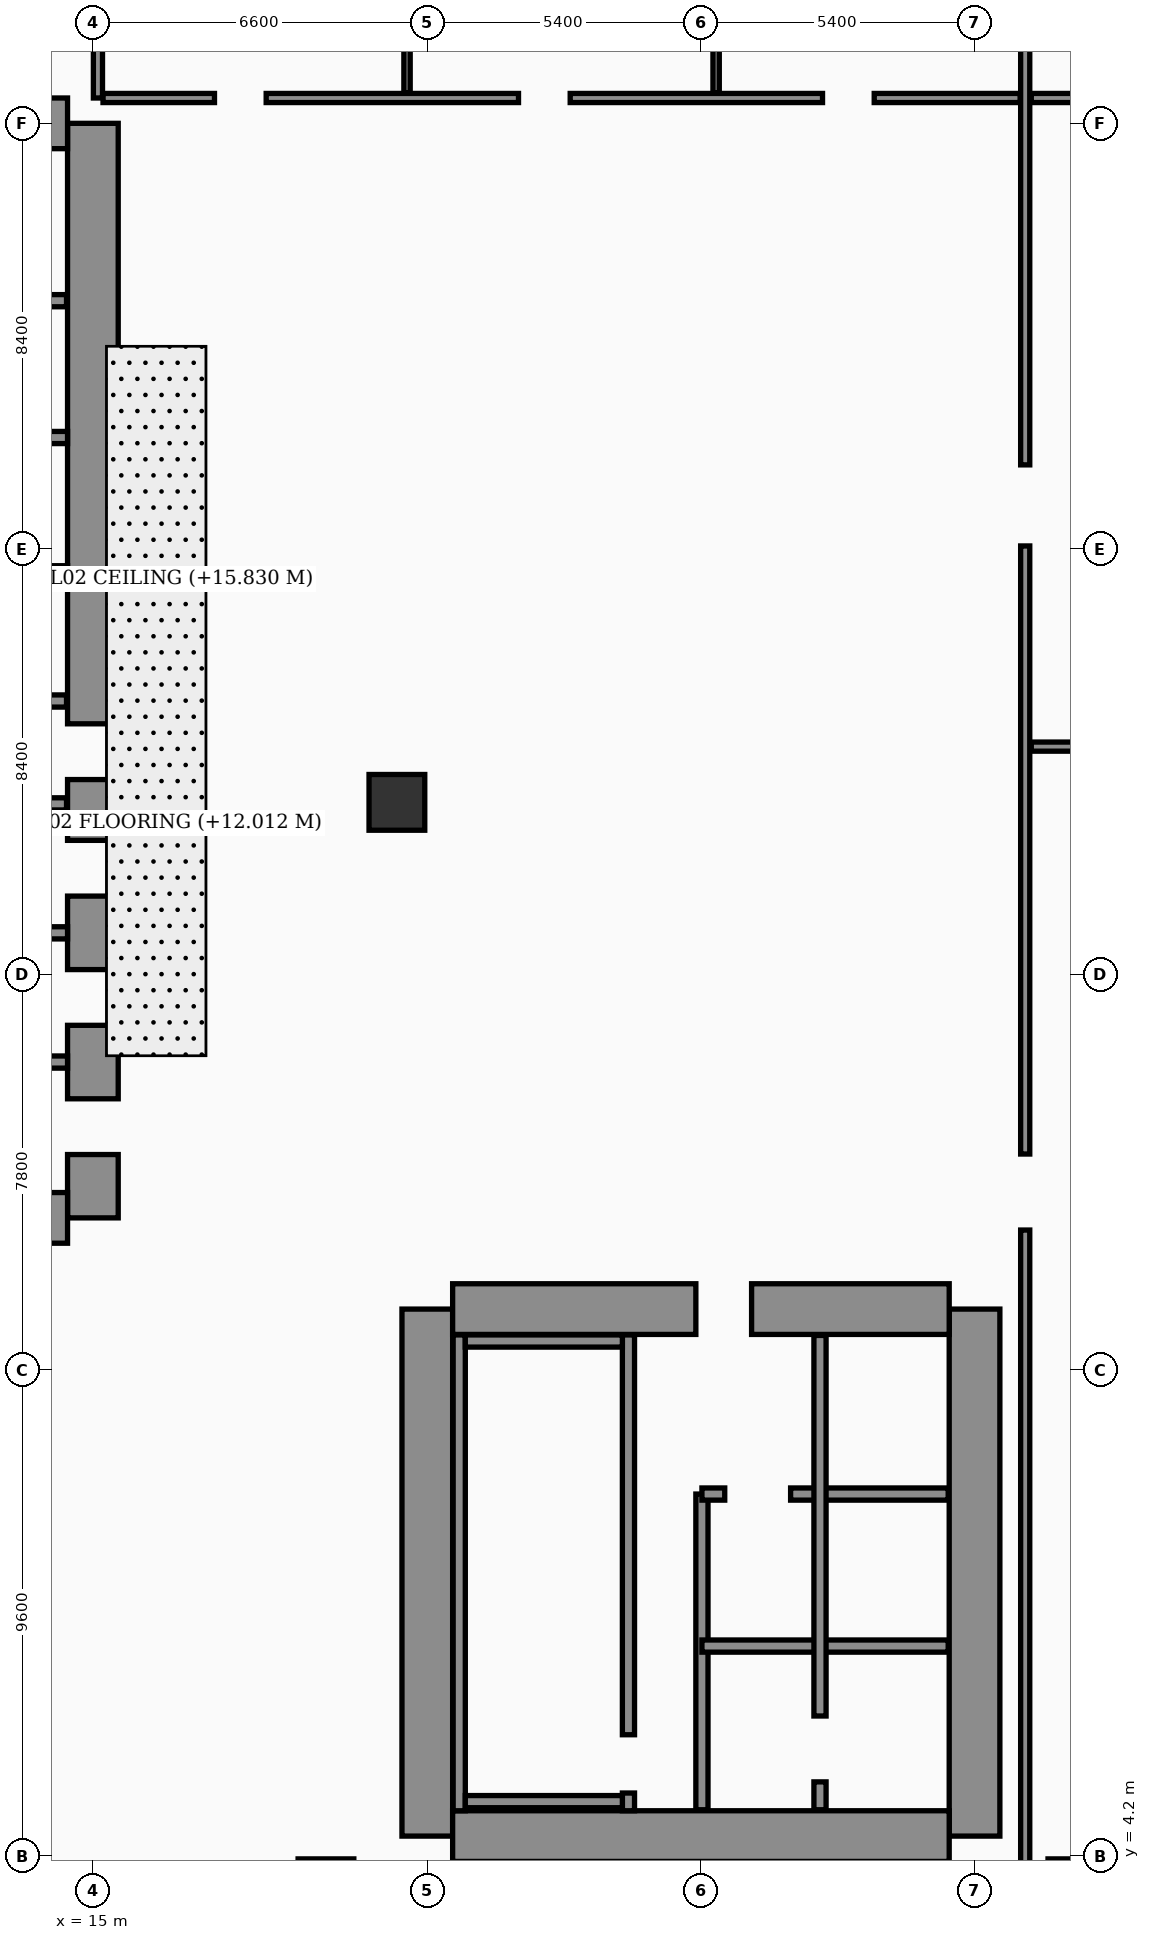
"""IFC4 building model, lengths in metres.
Left out: names, types, materials, properties, quantities, classifications, styles, units other than length and angle.
Written with IfcOpenShell. Run it as: python <this file> out.ifc"""

import sys

from ifc_helpers import new_model, si_unit, direction, frame, frame_2d, origin, origin_2d, place, context, subcontext, project, spatial, rectangle, hollow_rectangle, extrude, element, fill, save


model = new_model("IFC4")
c1 = context("Model", 3, precision=1e-05, world=origin(), true_north=direction((0.0, 1.0)))
c2 = subcontext(c1, "Body", "Model", "MODEL_VIEW")
j1 = project(units=[si_unit("LENGTHUNIT", "METRE"), si_unit("PLANEANGLEUNIT", "RADIAN")], contexts=[c1])
p1 = place(None, origin())
s1 = spatial("IfcSite", under=j1, at=p1, CompositionType="ELEMENT")
p2 = place(p1, origin())
s2 = spatial("IfcBuilding", under=s1, at=p2, CompositionType="ELEMENT")
p3 = place(p2, frame((0.0, 0.0, 12.0)))
s3 = spatial("IfcBuildingStorey", under=s2, at=p3, CompositionType="ELEMENT", Elevation=12.0)
p4 = place(p3, frame((15.0, 16.8, 0.0), z_axis=(0.0, 0.0, 1.0), x_axis=(0.0, 1.0, 0.0)))
e1 = element("IfcWall", 1, at=p4, inside=s3, PredefinedType="SHEAR", context=c2, shape_type="SweptSolid", body=[
    extrude(rectangle(XDim=21.6, YDim=1.0, at=frame_2d((10.8, 0.0))), origin(), (0.0, 0.0, 1.0), 4.68),
])
p5 = place(p4, frame((8.65, 0.0, 0.0)))
e2 = element("IfcOpeningElement", 2, at=p5, cuts=e1, PredefinedType="OPENING", context=c2, shape_type="SweptSolid", body=[
    extrude(rectangle(XDim=1.1, YDim=2.2, at=frame_2d((0.55, 1.1))), frame((0.0, 0.51, 0.0), z_axis=(0.0, -1.0, 0.0), x_axis=(1.0, 0.0, 0.0)), (0.0, 0.0, 1.0), 1.02),
])
p6 = place(p4, frame((1.25, 0.0, 0.0)))
e3 = element("IfcOpeningElement", 3, at=p6, cuts=e1, PredefinedType="OPENING", context=c2, shape_type="SweptSolid", body=[
    extrude(rectangle(XDim=1.1, YDim=2.2, at=frame_2d((0.55, 1.1))), frame((0.0, 0.51, 0.0), z_axis=(0.0, -1.0, 0.0), x_axis=(1.0, 0.0, 0.0)), (0.0, 0.0, 1.0), 1.02),
])
p7 = place(p4, frame((3.8, 0.0, 0.0)))
e4 = element("IfcOpeningElement", 4, at=p7, cuts=e1, PredefinedType="OPENING", context=c2, shape_type="SweptSolid", body=[
    extrude(rectangle(XDim=1.1, YDim=2.2, at=frame_2d((0.55, 1.1))), frame((0.0, 0.51, 0.0), z_axis=(0.0, -1.0, 0.0), x_axis=(1.0, 0.0, 0.0)), (0.0, 0.0, 1.0), 1.02),
])
p8 = place(p4, frame((6.35, 0.0, 0.0)))
e5 = element("IfcOpeningElement", 5, at=p8, cuts=e1, PredefinedType="OPENING", context=c2, shape_type="SweptSolid", body=[
    extrude(rectangle(XDim=1.1, YDim=2.2, at=frame_2d((0.55, 1.1))), frame((0.0, 0.51, 0.0), z_axis=(0.0, -1.0, 0.0), x_axis=(1.0, 0.0, 0.0)), (0.0, 0.0, 1.0), 1.02),
])
for number, where, z_axis, x_axis in (
    (6, (4.7, 38.4, 0.0), (0.0, 0.0, 1.0), (1.0, 0.0, 0.0)),
    (7, (4.7, 16.8, 0.0), (0.0, 0.0, 1.0), (1.0, 0.0, 0.0)),
):
    element("IfcWall", number, at=place(p3, frame(where, z_axis=z_axis, x_axis=x_axis)), inside=s3, PredefinedType="SHEAR", context=c2, shape_type="SweptSolid", body=[
        extrude(rectangle(XDim=9.8, YDim=1.0, at=frame_2d((4.9, 0.0))), origin(), (0.0, 0.0, 1.0), 4.68),
    ])
for number, where, z_axis, x_axis in (
    (8, (21.6, 4.6, 0.0), (0.0, 0.0, 1.0), (0.0, 1.0, 0.0)),
    (9, (32.4, 4.6, 0.0), (0.0, 0.0, 1.0), (0.0, 1.0, 0.0)),
):
    element("IfcWall", number, at=place(p3, frame(where, z_axis=z_axis, x_axis=x_axis)), inside=s3, PredefinedType="SHEAR", context=c2, shape_type="SweptSolid", body=[
        extrude(rectangle(XDim=10.4, YDim=1.0, at=frame_2d((5.2, 0.0))), origin(), (0.0, 0.0, 1.0), 4.68),
    ])
p9 = place(p3, frame((22.1, 15.0, 0.0), z_axis=(0.0, 0.0, 1.0), x_axis=(1.0, 0.0, 0.0)))
e10 = element("IfcWall", 10, at=p9, inside=s3, PredefinedType="SHEAR", context=c2, shape_type="SweptSolid", body=[
    extrude(rectangle(XDim=9.8, YDim=1.0, at=frame_2d((4.9, 0.0))), origin(), (0.0, 0.0, 1.0), 4.68),
])
p10 = place(p9, frame((4.8, 0.0, 0.0)))
e11 = element("IfcOpeningElement", 11, at=p10, cuts=e10, PredefinedType="OPENING", context=c2, shape_type="SweptSolid", body=[
    extrude(rectangle(XDim=1.1, YDim=2.2, at=frame_2d((0.55, 1.1))), frame((0.0, 0.51, 0.0), z_axis=(0.0, -1.0, 0.0), x_axis=(1.0, 0.0, 0.0)), (0.0, 0.0, 1.0), 1.02),
])
p11 = place(p3, frame((22.1, 4.6, 0.0), z_axis=(0.0, 0.0, 1.0), x_axis=(1.0, 0.0, 0.0)))
e12 = element("IfcWall", 12, at=p11, inside=s3, PredefinedType="SHEAR", context=c2, shape_type="SweptSolid", body=[
    extrude(rectangle(XDim=9.8, YDim=1.0, at=frame_2d((4.9, 0.0))), origin(), (0.0, 0.0, 1.0), 4.68),
])
p12 = place(p3, frame((22.23, 5.1, 0.0), z_axis=(0.0, 0.0, 1.0), x_axis=(0.0, 1.0, 0.0)))
e13 = element("IfcWall", 13, at=p12, inside=s3, PredefinedType="SOLIDWALL", context=c2, shape_type="SweptSolid", body=[
    extrude(rectangle(XDim=9.39, YDim=0.24, at=frame_2d((4.695, 0.0))), origin(), (0.0, 0.0, 1.0), 4.68),
])
p13 = place(p3, frame((25.57, 5.1, 0.0), z_axis=(0.0, 0.0, 1.0), x_axis=(0.0, 1.0, 0.0)))
e14 = element("IfcWall", 14, at=p13, inside=s3, PredefinedType="SOLIDWALL", context=c2, shape_type="SweptSolid", body=[
    extrude(rectangle(XDim=9.39, YDim=0.24, at=frame_2d((4.695, 0.0))), origin(), (0.0, 0.0, 1.0), 4.68),
])
p14 = place(p13, frame((0.35, 0.0, 0.0)))
e15 = element("IfcOpeningElement", 15, at=p14, cuts=e14, PredefinedType="OPENING", context=c2, shape_type="SweptSolid", body=[
    extrude(rectangle(XDim=1.15, YDim=2.2, at=frame_2d((0.575, 1.1))), frame((0.0, 0.13, 0.0), z_axis=(0.0, -1.0, 0.0), x_axis=(1.0, 0.0, 0.0)), (0.0, 0.0, 1.0), 0.26),
])
for number, where, z_axis, x_axis in (
    (16, (22.35, 5.28, 0.0), (0.0, 0.0, 1.0), (1.0, 0.0, 0.0)),
    (17, (22.35, 14.37, 0.0), (0.0, 0.0, 1.0), (1.0, 0.0, 0.0)),
):
    element("IfcWall", number, at=place(p3, frame(where, z_axis=z_axis, x_axis=x_axis)), inside=s3, PredefinedType="SOLIDWALL", context=c2, shape_type="SweptSolid", body=[
        extrude(rectangle(XDim=3.1, YDim=0.24, at=frame_2d((1.55, 0.0))), origin(), (0.0, 0.0, 1.0), 4.68),
    ])
for number, where, z_axis, x_axis in (
    (18, (12.18, 19.875, 0.0), (0.0, 0.0, 1.0), (1.0, 0.0, 0.0)),
    (19, (12.18, 22.425, 0.0), (0.0, 0.0, 1.0), (1.0, 0.0, 0.0)),
    (20, (12.18, 29.55, 0.0), (0.0, 0.0, 1.0), (1.0, 0.0, 0.0)),
    (21, (12.18, 32.2, 0.0), (0.0, 0.0, 1.0), (1.0, 0.0, 0.0)),
):
    element("IfcWall", number, at=place(p3, frame(where, z_axis=z_axis, x_axis=x_axis)), inside=s3, PredefinedType="SOLIDWALL", context=c2, shape_type="SweptSolid", body=[
        extrude(rectangle(XDim=2.32, YDim=0.24, at=frame_2d((1.16, 0.0))), origin(), (0.0, 0.0, 1.0), 4.68),
    ])
for number, where, z_axis, x_axis in (
    (22, (21.0, 25.0, 0.0), (0.0, 0.0, 1.0), (1.0, 0.0, 0.0)),
    (23, (19.6, 3.6, 0.0), (0.0, 0.0, 1.0), (1.0, 0.0, 0.0)),
    (24, (34.4, 3.6, 0.0), (0.0, 0.0, 1.0), (1.0, 0.0, 0.0)),
):
    element("IfcColumn", number, at=place(p3, frame(where, z_axis=z_axis, x_axis=x_axis)), inside=s3, PredefinedType="COLUMN", context=c2, shape_type="SweptSolid", body=[
        extrude(hollow_rectangle(XDim=1.1, YDim=1.1, WallThickness=0.045, at=origin_2d()), origin(), (0.0, 0.0, 1.0), 4.68),
    ])
p15 = place(p3, frame((12.15, 24.97, 0.0), z_axis=(0.0, 0.0, 1.0), x_axis=(1.0, 0.0, 0.0)))
e25 = element("IfcWall", 25, at=p15, inside=s3, PredefinedType="SOLIDWALL", context=c2, shape_type="SweptSolid", body=[
    extrude(rectangle(XDim=2.33, YDim=0.24, at=frame_2d((1.165, 0.0))), origin(), (0.0, 0.0, 1.0), 3.88),
])
p16 = place(p3, frame((12.25, 27.0, 0.0), z_axis=(0.0, 0.0, 1.0), x_axis=(1.0, 0.0, 0.0)))
e26 = element("IfcWall", 26, at=p16, inside=s3, PredefinedType="SOLIDWALL", context=c2, shape_type="SweptSolid", body=[
    extrude(rectangle(XDim=2.23, YDim=0.24, at=frame_2d((1.115, 0.0))), origin(), (0.0, 0.0, 1.0), 4.68),
])
p17 = place(p3, frame((9.66, 34.9, 0.0), z_axis=(0.0, 0.0, 1.0), x_axis=(1.0, 0.0, 0.0)))
e27 = element("IfcWall", 27, at=p17, inside=s3, PredefinedType="SOLIDWALL", context=c2, shape_type="SweptSolid", body=[
    extrude(rectangle(XDim=4.82, YDim=0.24, at=frame_2d((2.41, 0.0))), origin(), (0.0, 0.0, 1.0), 4.68),
])
p18 = place(p3, frame((27.02, 5.12, 0.0), z_axis=(0.0, 0.0, 1.0), x_axis=(0.0, 1.0, 0.0)))
e28 = element("IfcWall", 28, at=p18, inside=s3, PredefinedType="SOLIDWALL", context=c2, shape_type="SweptSolid", body=[
    extrude(rectangle(XDim=6.23, YDim=0.24, at=frame_2d((3.115, 0.0))), origin(), (0.0, 0.0, 1.0), 4.68),
])
p19 = place(p3, frame((27.02, 11.35, 0.0), z_axis=(0.0, 0.0, 1.0), x_axis=(1.0, 0.0, 0.0)))
e29 = element("IfcWall", 29, at=p19, inside=s3, PredefinedType="SOLIDWALL", context=c2, shape_type="SweptSolid", body=[
    extrude(rectangle(XDim=4.86, YDim=0.24, at=frame_2d((2.43, 0.0))), origin(), (0.0, 0.0, 1.0), 4.68),
])
p20 = place(p19, frame((0.45, 0.0, 0.0)))
e30 = element("IfcOpeningElement", 30, at=p20, cuts=e29, PredefinedType="OPENING", context=c2, shape_type="SweptSolid", body=[
    extrude(rectangle(XDim=1.3, YDim=2.35, at=frame_2d((0.65, 1.175))), frame((0.0, 0.13, 0.0), z_axis=(0.0, -1.0, 0.0), x_axis=(1.0, 0.0, 0.0)), (0.0, 0.0, 1.0), 0.26),
])
p21 = place(p3, frame((27.02, 8.35, 0.0), z_axis=(0.0, 0.0, 1.0), x_axis=(1.0, 0.0, 0.0)))
e31 = element("IfcWall", 31, at=p21, inside=s3, PredefinedType="SOLIDWALL", context=c2, shape_type="SweptSolid", body=[
    extrude(rectangle(XDim=4.86, YDim=0.24, at=frame_2d((2.43, 0.0))), origin(), (0.0, 0.0, 1.0), 4.68),
])
p22 = place(p3, frame((29.35, 5.12, 0.0), z_axis=(0.0, 0.0, 1.0), x_axis=(0.0, 1.0, 0.0)))
e32 = element("IfcWall", 32, at=p22, inside=s3, PredefinedType="SOLIDWALL", context=c2, shape_type="SweptSolid", body=[
    extrude(rectangle(XDim=9.36, YDim=0.24, at=frame_2d((4.68, 0.0))), origin(), (0.0, 0.0, 1.0), 4.68),
])
p23 = place(p22, frame((0.55, 0.0, 0.0)))
e33 = element("IfcOpeningElement", 33, at=p23, cuts=e32, PredefinedType="OPENING", context=c2, shape_type="SweptSolid", body=[
    extrude(rectangle(XDim=1.3, YDim=2.35, at=frame_2d((0.65, 1.175))), frame((0.0, 0.13, 0.0), z_axis=(0.0, -1.0, 0.0), x_axis=(1.0, 0.0, 0.0)), (0.0, 0.0, 1.0), 0.26),
])
p24 = place(p3, frame((15.2, 38.9, 0.0), z_axis=(0.0, 0.0, 1.0), x_axis=(1.0, 0.0, 0.0)))
e34 = element("IfcWall", 34, at=p24, inside=s3, PredefinedType="PARTITIONING", context=c2, shape_type="SweptSolid", body=[
    extrude(rectangle(XDim=18.1, YDim=0.18, at=frame_2d((9.05, 0.0))), origin(), (0.0, 0.0, 1.0), 3.88),
])
p25 = place(p24, frame((2.2, 0.0, 0.0)))
e35 = element("IfcOpeningElement", 35, at=p25, cuts=e34, PredefinedType="OPENING", context=c2, shape_type="SweptSolid", body=[
    extrude(rectangle(XDim=1.02, YDim=2.2, at=frame_2d((0.51, 1.1))), frame((0.0, 0.1, 0.0), z_axis=(0.0, -1.0, 0.0), x_axis=(1.0, 0.0, 0.0)), (0.0, 0.0, 1.0), 0.2),
])
p26 = place(p24, frame((8.2, 0.0, 0.0)))
e36 = element("IfcOpeningElement", 36, at=p26, cuts=e34, PredefinedType="OPENING", context=c2, shape_type="SweptSolid", body=[
    extrude(rectangle(XDim=1.02, YDim=2.2, at=frame_2d((0.51, 1.1))), frame((0.0, 0.1, 0.0), z_axis=(0.0, -1.0, 0.0), x_axis=(1.0, 0.0, 0.0)), (0.0, 0.0, 1.0), 0.2),
])
p27 = place(p24, frame((14.2, 0.0, 0.0)))
e37 = element("IfcOpeningElement", 37, at=p27, cuts=e34, PredefinedType="OPENING", context=c2, shape_type="SweptSolid", body=[
    extrude(rectangle(XDim=1.02, YDim=2.2, at=frame_2d((0.51, 1.1))), frame((0.0, 0.1, 0.0), z_axis=(0.0, -1.0, 0.0), x_axis=(1.0, 0.0, 0.0)), (0.0, 0.0, 1.0), 0.2),
])
p28 = place(p3, frame((15.1, 38.9, 0.0), z_axis=(0.0, 0.0, 1.0), x_axis=(0.0, 1.0, 0.0)))
e38 = element("IfcWall", 38, at=p28, inside=s3, PredefinedType="PARTITIONING", context=c2, shape_type="SweptSolid", body=[
    extrude(rectangle(XDim=6.4, YDim=0.18, at=frame_2d((3.2, 0.0))), origin(), (0.0, 0.0, 1.0), 3.88),
])
p29 = place(p3, frame((21.2, 39.0, 0.0), z_axis=(0.0, 0.0, 1.0), x_axis=(0.0, 1.0, 0.0)))
e39 = element("IfcWall", 39, at=p29, inside=s3, PredefinedType="PARTITIONING", context=c2, shape_type="SweptSolid", body=[
    extrude(rectangle(XDim=6.2, YDim=0.125, at=frame_2d((3.1, 0.0))), origin(), (0.0, 0.0, 1.0), 3.88),
])
p30 = place(p3, frame((27.3, 39.0, 0.0), z_axis=(0.0, 0.0, 1.0), x_axis=(0.0, 1.0, 0.0)))
e40 = element("IfcWall", 40, at=p30, inside=s3, PredefinedType="PARTITIONING", context=c2, shape_type="SweptSolid", body=[
    extrude(rectangle(XDim=6.2, YDim=0.125, at=frame_2d((3.1, 0.0))), origin(), (0.0, 0.0, 1.0), 4.68),
])
p31 = place(p3, frame((33.4, 0.06, 0.0), z_axis=(0.0, 0.0, 1.0), x_axis=(0.0, 1.0, 0.0)))
e41 = element("IfcWall", 41, at=p31, inside=s3, PredefinedType="PARTITIONING", context=c2, shape_type="SweptSolid", body=[
    extrude(rectangle(XDim=57.88, YDim=0.18, at=frame_2d((28.94, 0.0))), origin(), (0.0, 0.0, 1.0), 3.88),
])
p32 = place(p31, frame((16.5, 0.0, 0.0)))
e42 = element("IfcOpeningElement", 42, at=p32, cuts=e41, PredefinedType="OPENING", context=c2, shape_type="SweptSolid", body=[
    extrude(rectangle(XDim=1.5, YDim=2.22, at=frame_2d((0.75, 1.11))), frame((0.0, 0.1, 0.0), z_axis=(0.0, -1.0, 0.0), x_axis=(1.0, 0.0, 0.0)), (0.0, 0.0, 1.0), 0.2),
])
p33 = place(p31, frame((30.0, 0.0, 0.0)))
e43 = element("IfcOpeningElement", 43, at=p33, cuts=e41, PredefinedType="OPENING", context=c2, shape_type="SweptSolid", body=[
    extrude(rectangle(XDim=1.6, YDim=2.35, at=frame_2d((0.8, 1.175))), frame((0.0, 0.1, 0.0), z_axis=(0.0, -1.0, 0.0), x_axis=(1.0, 0.0, 0.0)), (0.0, 0.0, 1.0), 0.2),
])
p34 = place(p3, frame((33.52, 26.1, 0.0), z_axis=(0.0, 0.0, 1.0), x_axis=(1.0, 0.0, 0.0)))
e44 = element("IfcWall", 44, at=p34, inside=s3, PredefinedType="PARTITIONING", context=c2, shape_type="SweptSolid", body=[
    extrude(rectangle(XDim=50.42, YDim=0.18, at=frame_2d((25.21, 0.0))), origin(), (0.0, 0.0, 1.0), 3.18),
])
p35 = place(p3, frame((33.52, 38.9, 0.0), z_axis=(0.0, 0.0, 1.0), x_axis=(1.0, 0.0, 0.0)))
e45 = element("IfcWall", 45, at=p35, inside=s3, PredefinedType="PARTITIONING", context=c2, shape_type="SweptSolid", body=[
    extrude(rectangle(XDim=50.42, YDim=0.18, at=frame_2d((25.21, 0.0))), origin(), (0.0, 0.0, 1.0), 3.88),
])
p36 = place(p20, origin())
e46 = element("IfcDoor", 46, at=p36, inside=s3, OperationType="DOUBLE_DOOR_SLIDING", PredefinedType="DOOR", context=c2, shape_type="SweptSolid", body=[
    extrude(rectangle(XDim=1.3, YDim=2.35, at=frame_2d((0.65, 1.175))), frame((0.0, 0.025, 0.0), z_axis=(0.0, -1.0, 0.0), x_axis=(1.0, 0.0, 0.0)), (0.0, 0.0, 1.0), 0.05),
])
fill(e30, e46)
p37 = place(p23, origin())
e47 = element("IfcDoor", 47, at=p37, inside=s3, OperationType="DOUBLE_DOOR_SLIDING", PredefinedType="DOOR", context=c2, shape_type="SweptSolid", body=[
    extrude(rectangle(XDim=1.3, YDim=2.35, at=frame_2d((0.65, 1.175))), frame((0.0, 0.025, 0.0), z_axis=(0.0, -1.0, 0.0), x_axis=(1.0, 0.0, 0.0)), (0.0, 0.0, 1.0), 0.05),
])
fill(e33, e47)
p38 = place(p25, origin())
e48 = element("IfcDoor", 48, at=p38, inside=s3, OperationType="SINGLE_SWING_LEFT", PredefinedType="DOOR", context=c2, shape_type="SweptSolid", body=[
    extrude(rectangle(XDim=1.02, YDim=2.2, at=frame_2d((0.51, 1.1))), frame((0.0, 0.025, 0.0), z_axis=(0.0, -1.0, 0.0), x_axis=(1.0, 0.0, 0.0)), (0.0, 0.0, 1.0), 0.05),
])
fill(e35, e48)
p39 = place(p26, origin())
e49 = element("IfcDoor", 49, at=p39, inside=s3, OperationType="SINGLE_SWING_RIGHT", PredefinedType="DOOR", context=c2, shape_type="SweptSolid", body=[
    extrude(rectangle(XDim=1.02, YDim=2.2, at=frame_2d((0.51, 1.1))), frame((0.0, 0.025, 0.0), z_axis=(0.0, -1.0, 0.0), x_axis=(1.0, 0.0, 0.0)), (0.0, 0.0, 1.0), 0.05),
])
fill(e36, e49)
p40 = place(p27, origin())
e50 = element("IfcDoor", 50, at=p40, inside=s3, OperationType="SINGLE_SWING_LEFT", PredefinedType="DOOR", context=c2, shape_type="SweptSolid", body=[
    extrude(rectangle(XDim=1.02, YDim=2.2, at=frame_2d((0.51, 1.1))), frame((0.0, 0.025, 0.0), z_axis=(0.0, -1.0, 0.0), x_axis=(1.0, 0.0, 0.0)), (0.0, 0.0, 1.0), 0.05),
])
fill(e37, e50)
p41 = place(p32, origin())
e51 = element("IfcDoor", 51, at=p41, inside=s3, OperationType="SINGLE_SWING_LEFT", PredefinedType="DOOR", context=c2, shape_type="SweptSolid", body=[
    extrude(rectangle(XDim=1.5, YDim=2.22, at=frame_2d((0.75, 1.11))), frame((0.0, 0.025, 0.0), z_axis=(0.0, -1.0, 0.0), x_axis=(1.0, 0.0, 0.0)), (0.0, 0.0, 1.0), 0.05),
])
fill(e42, e51)
p42 = place(p33, origin())
e52 = element("IfcDoor", 52, at=p42, inside=s3, OperationType="SINGLE_SWING_RIGHT", PredefinedType="DOOR", context=c2, shape_type="SweptSolid", body=[
    extrude(rectangle(XDim=1.6, YDim=2.35, at=frame_2d((0.8, 1.175))), frame((0.0, 0.025, 0.0), z_axis=(0.0, -1.0, 0.0), x_axis=(1.0, 0.0, 0.0)), (0.0, 0.0, 1.0), 0.05),
])
fill(e43, e52)
p43 = place(p14, origin())
e53 = element("IfcDoor", 53, at=p43, inside=s3, OperationType="SINGLE_SWING_RIGHT", PredefinedType="DOOR", context=c2, shape_type="SweptSolid", body=[
    extrude(rectangle(XDim=1.15, YDim=2.2, at=frame_2d((0.575, 1.1))), frame((0.0, 0.025, 0.0), z_axis=(0.0, -1.0, 0.0), x_axis=(1.0, 0.0, 0.0)), (0.0, 0.0, 1.0), 0.05),
])
fill(e15, e53)
p44 = place(p5, origin())
e54 = element("IfcDoor", 54, at=p44, inside=s3, OperationType="SINGLE_SWING_LEFT", PredefinedType="DOOR", context=c2, shape_type="SweptSolid", body=[
    extrude(rectangle(XDim=1.1, YDim=2.2, at=frame_2d((0.55, 1.1))), frame((0.0, 0.025, 0.0), z_axis=(0.0, -1.0, 0.0), x_axis=(1.0, 0.0, 0.0)), (0.0, 0.0, 1.0), 0.05),
])
fill(e2, e54)
p45 = place(p6, origin())
e55 = element("IfcDoor", 55, at=p45, inside=s3, OperationType="DOUBLE_DOOR_SLIDING", PredefinedType="DOOR", context=c2, shape_type="SweptSolid", body=[
    extrude(rectangle(XDim=1.1, YDim=2.2, at=frame_2d((0.55, 1.1))), frame((0.0, 0.025, 0.0), z_axis=(0.0, -1.0, 0.0), x_axis=(1.0, 0.0, 0.0)), (0.0, 0.0, 1.0), 0.05),
])
fill(e3, e55)
p46 = place(p7, origin())
e56 = element("IfcDoor", 56, at=p46, inside=s3, OperationType="DOUBLE_DOOR_SLIDING", PredefinedType="DOOR", context=c2, shape_type="SweptSolid", body=[
    extrude(rectangle(XDim=1.1, YDim=2.2, at=frame_2d((0.55, 1.1))), frame((0.0, 0.025, 0.0), z_axis=(0.0, -1.0, 0.0), x_axis=(1.0, 0.0, 0.0)), (0.0, 0.0, 1.0), 0.05),
])
fill(e4, e56)
p47 = place(p8, origin())
e57 = element("IfcDoor", 57, at=p47, inside=s3, OperationType="DOUBLE_DOOR_SLIDING", PredefinedType="DOOR", context=c2, shape_type="SweptSolid", body=[
    extrude(rectangle(XDim=1.1, YDim=2.2, at=frame_2d((0.55, 1.1))), frame((0.0, 0.025, 0.0), z_axis=(0.0, -1.0, 0.0), x_axis=(1.0, 0.0, 0.0)), (0.0, 0.0, 1.0), 0.05),
])
fill(e5, e57)
p48 = place(p10, origin())
e58 = element("IfcDoor", 58, at=p48, inside=s3, OperationType="SINGLE_SWING_RIGHT", PredefinedType="DOOR", context=c2, shape_type="SweptSolid", body=[
    extrude(rectangle(XDim=1.1, YDim=2.2, at=frame_2d((0.55, 1.1))), frame((0.0, 0.025, 0.0), z_axis=(0.0, -1.0, 0.0), x_axis=(1.0, 0.0, 0.0)), (0.0, 0.0, 1.0), 0.05),
])
fill(e11, e58)
save(model, sys.argv[1])
